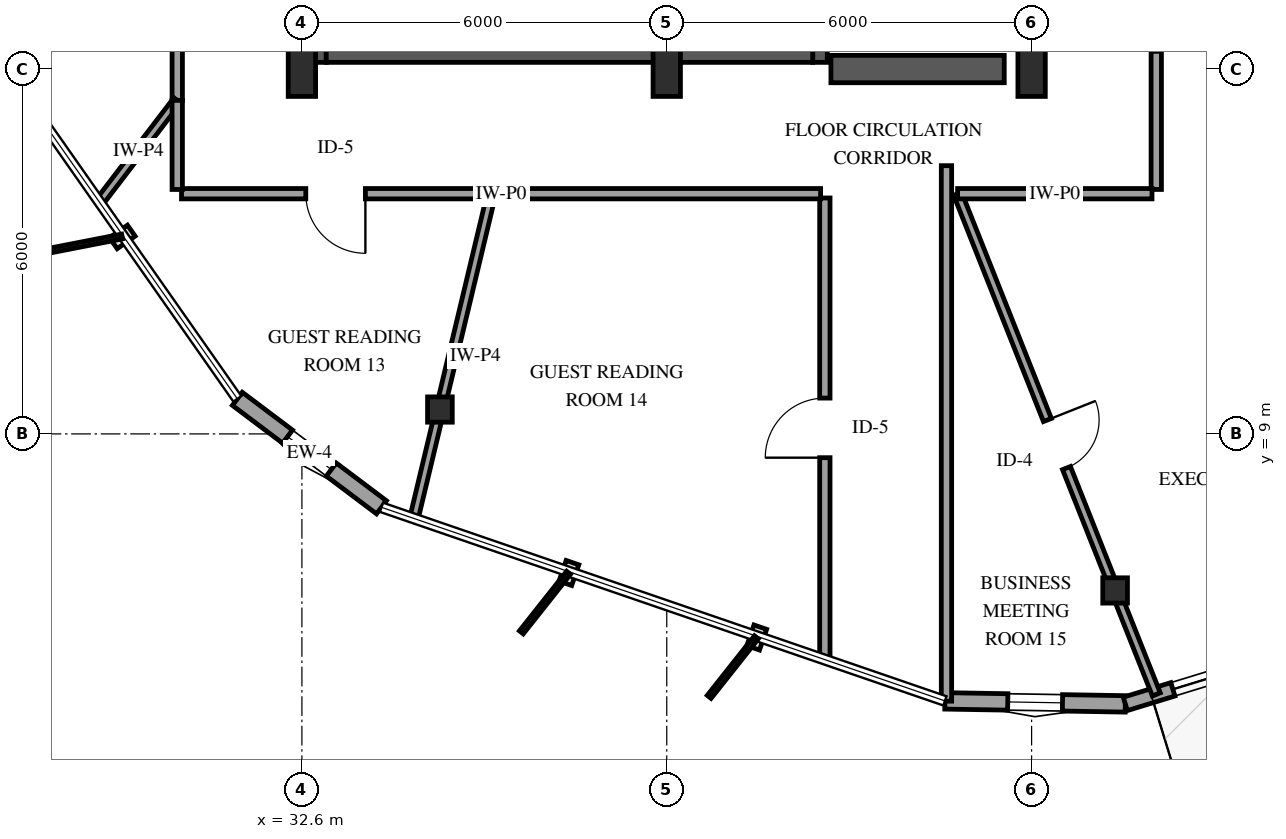
"""IFC4 building model, lengths in metres.
Left out: names, types, materials, properties, quantities, classifications, styles, units other than length and angle.
Written with IfcOpenShell. Run it as: python <this file> out.ifc"""

import sys

from ifc_helpers import new_model, si_unit, direction, frame, frame_2d, origin, origin_2d, place, context, subcontext, project, spatial, rectangle, i_section, extrude, element, fill, save


model = new_model("IFC4")
c1 = context("Model", 3, precision=1e-05, world=origin(), true_north=direction((0.0, 1.0)))
c2 = subcontext(c1, "Body", "Model", "MODEL_VIEW")
j1 = project(units=[si_unit("LENGTHUNIT", "METRE"), si_unit("PLANEANGLEUNIT", "RADIAN")], contexts=[c1])
p1 = place(None, origin())
s1 = spatial("IfcSite", under=j1, at=p1, CompositionType="ELEMENT")
p2 = place(p1, origin())
s2 = spatial("IfcBuilding", under=s1, at=p2, CompositionType="ELEMENT")
p3 = place(p2, frame((0.0, 0.0, 226.6)))
s3 = spatial("IfcBuildingStorey", under=s2, at=p3, CompositionType="ELEMENT", Elevation=226.6)
p4 = place(p3, frame((32.88, 15.11, 0.0), z_axis=(0.0, 0.0, 1.0), x_axis=(0.0, 1.0, 0.0)))
e1 = element("IfcWall", 1, at=p4, inside=s3, PredefinedType="SHEAR", context=c2, shape_type="SweptSolid", body=[
    extrude(rectangle(XDim=3.63, YDim=0.24, at=frame_2d((1.815, 0.0))), origin(), (0.0, 0.0, 1.0), 3.6),
])
p5 = place(p3, frame((41.12, 15.11, 0.0), z_axis=(0.0, 0.0, 1.0), x_axis=(0.0, 1.0, 0.0)))
e2 = element("IfcWall", 2, at=p5, inside=s3, PredefinedType="SHEAR", context=c2, shape_type="SweptSolid", body=[
    extrude(rectangle(XDim=3.63, YDim=0.24, at=frame_2d((1.815, 0.0))), origin(), (0.0, 0.0, 1.0), 3.6),
])
p6 = place(p5, frame((1.255, 0.0, 0.0)))
e3 = element("IfcOpeningElement", 3, at=p6, cuts=e2, PredefinedType="OPENING", context=c2, shape_type="SweptSolid", body=[
    extrude(rectangle(XDim=1.12, YDim=2.15, at=frame_2d((0.56, 1.075))), frame((0.0, 0.13, 0.0), z_axis=(0.0, -1.0, 0.0), x_axis=(1.0, 0.0, 0.0)), (0.0, 0.0, 1.0), 0.26),
])
p7 = place(p3, frame((33.0, 15.23, 0.0), z_axis=(0.0, 0.0, 1.0), x_axis=(1.0, 0.0, 0.0)))
e4 = element("IfcWall", 4, at=p7, inside=s3, PredefinedType="SHEAR", context=c2, shape_type="SweptSolid", body=[
    extrude(rectangle(XDim=8.0, YDim=0.24, at=frame_2d((4.0, 0.0))), origin(), (0.0, 0.0, 1.0), 3.6),
])
p8 = place(p3, frame((41.3, 15.0, 0.0), z_axis=(0.0, 0.0, 1.0), x_axis=(1.0, 0.0, 0.0)))
e5 = element("IfcWall", 5, at=p8, inside=s3, PredefinedType="SHEAR", context=c2, shape_type="SweptSolid", body=[
    extrude(rectangle(XDim=2.85, YDim=0.45, at=frame_2d((1.425, 0.0))), origin(), (0.0, 0.0, 1.0), 3.6),
])
for number, where, z_axis, x_axis in (
    (6, (32.6, 15.0, 0.0), (0.0, 0.0, 1.0), (1.0, 0.0, 0.0)),
    (7, (38.6, 15.0, 0.0), (0.0, 0.0, 1.0), (1.0, 0.0, 0.0)),
    (8, (44.6, 15.0, 0.0), (0.0, 0.0, 1.0), (1.0, 0.0, 0.0)),
):
    element("IfcColumn", number, at=place(p3, frame(where, z_axis=z_axis, x_axis=x_axis)), inside=s3, PredefinedType="PILASTER", context=c2, shape_type="SweptSolid", body=[
        extrude(rectangle(XDim=0.45, YDim=0.9, at=origin_2d()), origin(), (0.0, 0.0, 1.0), 3.6),
    ])
for number, where, z_axis, x_axis in (
    (9, (34.87, 9.401, 0.0), (0.0, 0.0, 1.0), (1.0, 0.0, 0.0)),
    (10, (45.973, 6.426, 0.0), (0.0, 0.0, 1.0), (1.0, 0.0, 0.0)),
):
    element("IfcColumn", number, at=place(p3, frame(where, z_axis=z_axis, x_axis=x_axis)), inside=s3, PredefinedType="COLUMN", context=c2, shape_type="SweptSolid", body=[
        extrude(i_section(OverallWidth=0.406, OverallDepth=0.416, WebThickness=0.03, FlangeThickness=0.048, FilletRadius=0.038, at=origin_2d()), origin(), (0.0, 0.0, 1.0), 3.6),
    ])
p9 = place(p3, frame((31.538, 9.577, 0.0), z_axis=(0.0, 0.0, 1.0), x_axis=(0.799041019951, -0.601276515786, 0.0)))
e11 = element("IfcWall", 11, at=p9, inside=s3, PredefinedType="SOLIDWALL", context=c2, shape_type="SweptSolid", body=[
    extrude(rectangle(XDim=2.967, YDim=0.27, at=frame_2d((1.483, 0.0))), origin(), (0.0, 0.0, 1.0), 2.679),
])
p10 = place(p9, frame((1.033, 0.0, 0.75)))
e12 = element("IfcOpeningElement", 12, at=p10, cuts=e11, PredefinedType="OPENING", context=c2, shape_type="SweptSolid", body=[
    extrude(rectangle(XDim=0.9, YDim=1.5, at=frame_2d((0.45, 0.75))), frame((0.0, 0.145, 0.0), z_axis=(0.0, -1.0, 0.0), x_axis=(1.0, 0.0, 0.0)), (0.0, 0.0, 1.0), 0.29),
])
p11 = place(p3, frame((43.175, 4.61, 0.0), z_axis=(0.0, 0.0, 1.0), x_axis=(0.999860453609, -0.016705487414, 0.0)))
e13 = element("IfcWall", 13, at=p11, inside=s3, PredefinedType="SOLIDWALL", context=c2, shape_type="SweptSolid", body=[
    extrude(rectangle(XDim=2.967, YDim=0.27, at=frame_2d((1.483, 0.0))), origin(), (0.0, 0.0, 1.0), 2.679),
])
p12 = place(p11, frame((1.033, 0.0, 0.75)))
e14 = element("IfcOpeningElement", 14, at=p12, cuts=e13, PredefinedType="OPENING", context=c2, shape_type="SweptSolid", body=[
    extrude(rectangle(XDim=0.9, YDim=1.5, at=frame_2d((0.45, 0.75))), frame((0.0, 0.145, 0.0), z_axis=(0.0, -1.0, 0.0), x_axis=(1.0, 0.0, 0.0)), (0.0, 0.0, 1.0), 0.29),
])
p13 = place(p3, frame((46.141, 4.56, 0.0), z_axis=(0.0, 0.0, 1.0), x_axis=(0.956099551419, 0.293042058033, 0.0)))
e15 = element("IfcWall", 15, at=p13, inside=s3, PredefinedType="SOLIDWALL", context=c2, shape_type="SweptSolid", body=[
    extrude(rectangle(XDim=9.798, YDim=0.23, at=frame_2d((4.899, 0.0))), origin(), (0.0, 0.0, 1.0), 2.679),
])
p14 = place(p13, frame((4.399, 0.0, 0.0)))
e16 = element("IfcOpeningElement", 16, at=p14, cuts=e15, PredefinedType="OPENING", context=c2, shape_type="SweptSolid", body=[
    extrude(rectangle(XDim=1.0, YDim=2.15, at=frame_2d((0.5, 1.075))), frame((0.0, 0.125, 0.0), z_axis=(0.0, -1.0, 0.0), x_axis=(1.0, 0.0, 0.0)), (0.0, 0.0, 1.0), 0.25),
])
p15 = place(p13, frame((0.818, 0.0, 0.72)))
e17 = element("IfcOpeningElement", 17, at=p15, cuts=e15, PredefinedType="OPENING", context=c2, shape_type="SweptSolid", body=[
    extrude(rectangle(XDim=1.05, YDim=1.55, at=frame_2d((0.525, 0.775))), frame((0.0, 0.125, 0.0), z_axis=(0.0, -1.0, 0.0), x_axis=(1.0, 0.0, 0.0)), (0.0, 0.0, 1.0), 0.25),
])
p16 = place(p13, frame((6.039, 0.0, 0.72)))
e18 = element("IfcOpeningElement", 18, at=p16, cuts=e15, PredefinedType="OPENING", context=c2, shape_type="SweptSolid", body=[
    extrude(rectangle(XDim=1.05, YDim=1.55, at=frame_2d((0.525, 0.775))), frame((0.0, 0.125, 0.0), z_axis=(0.0, -1.0, 0.0), x_axis=(1.0, 0.0, 0.0)), (0.0, 0.0, 1.0), 0.25),
])
p17 = place(p3, frame((46.65, 21.265, 0.0), z_axis=(0.0, 0.0, 1.0), x_axis=(0.907114550352, -0.420883823091, 0.0)))
e19 = element("IfcWall", 19, at=p17, inside=s3, PredefinedType="PARTITIONING", context=c2, shape_type="SweptSolid", body=[
    extrude(rectangle(XDim=16.682, YDim=0.13, at=frame_2d((8.341, 0.0))), origin(), (0.0, 0.0, 1.0), 3.3),
])
p18 = place(p3, frame((46.65, 18.573, 0.0), z_axis=(0.0, 0.0, 1.0), x_axis=(0.781476039423, -0.623935252897, 0.0)))
e20 = element("IfcWall", 20, at=p18, inside=s3, PredefinedType="PARTITIONING", context=c2, shape_type="SweptSolid", body=[
    extrude(rectangle(XDim=14.7, YDim=0.11, at=frame_2d((7.35, 0.0))), origin(), (0.0, 0.0, 1.0), 3.3),
])
p19 = place(p3, frame((43.383, 12.95, 0.0), z_axis=(0.0, 0.0, 1.0), x_axis=(0.368885203629, -0.929474962838, 0.0)))
e21 = element("IfcWall", 21, at=p19, inside=s3, PredefinedType="PARTITIONING", context=c2, shape_type="SweptSolid", body=[
    extrude(rectangle(XDim=8.859, YDim=0.14, at=frame_2d((4.429, 0.0))), origin(), (0.0, 0.0, 1.0), 2.595),
])
p20 = place(p19, frame((4.004, 0.0, 0.0)))
e22 = element("IfcOpeningElement", 22, at=p20, cuts=e21, PredefinedType="OPENING", context=c2, shape_type="SweptSolid", body=[
    extrude(rectangle(XDim=0.85, YDim=2.1, at=frame_2d((0.425, 1.05))), frame((0.0, 0.08, 0.0), z_axis=(0.0, -1.0, 0.0), x_axis=(1.0, 0.0, 0.0)), (0.0, 0.0, 1.0), 0.16),
])
p21 = place(p3, frame((41.2, 5.288, 0.0), z_axis=(0.0, 0.0, 1.0), x_axis=(0.0, 1.0, 0.0)))
e23 = element("IfcWall", 23, at=p21, inside=s3, PredefinedType="PARTITIONING", context=c2, shape_type="SweptSolid", body=[
    extrude(rectangle(XDim=7.592, YDim=0.17, at=frame_2d((3.796, 0.0))), origin(), (0.0, 0.0, 1.0), 3.3),
])
p22 = place(p21, frame((3.321, 0.0, 0.0)))
e24 = element("IfcOpeningElement", 24, at=p22, cuts=e23, PredefinedType="OPENING", context=c2, shape_type="SweptSolid", body=[
    extrude(rectangle(XDim=0.98, YDim=2.15, at=frame_2d((0.49, 1.075))), frame((0.0, 0.095, 0.0), z_axis=(0.0, -1.0, 0.0), x_axis=(1.0, 0.0, 0.0)), (0.0, 0.0, 1.0), 0.19),
])
p23 = place(p3, frame((30.55, 14.485, 0.0), z_axis=(0.0, 0.0, 1.0), x_axis=(0.0, 1.0, 0.0)))
e25 = element("IfcWall", 25, at=p23, inside=s3, PredefinedType="PARTITIONING", context=c2, shape_type="SweptSolid", body=[
    extrude(rectangle(XDim=5.621, YDim=0.17, at=frame_2d((2.811, 0.0))), origin(), (0.0, 0.0, 1.0), 3.3),
])
p24 = place(p23, frame((2.336, 0.0, 0.0)))
e26 = element("IfcOpeningElement", 26, at=p24, cuts=e25, PredefinedType="OPENING", context=c2, shape_type="SweptSolid", body=[
    extrude(rectangle(XDim=0.98, YDim=2.15, at=frame_2d((0.49, 1.075))), frame((0.0, 0.095, 0.0), z_axis=(0.0, -1.0, 0.0), x_axis=(1.0, 0.0, 0.0)), (0.0, 0.0, 1.0), 0.19),
])
p25 = place(p3, frame((46.65, 18.573, 0.0), z_axis=(0.0, 0.0, 1.0), x_axis=(0.0, -1.0, 0.0)))
e27 = element("IfcWall", 27, at=p25, inside=s3, PredefinedType="PARTITIONING", context=c2, shape_type="SweptSolid", body=[
    extrude(rectangle(XDim=5.553, YDim=0.17, at=frame_2d((2.776, 0.0))), origin(), (0.0, 0.0, 1.0), 3.3),
])
p26 = place(p25, frame((2.302, 0.0, 0.0)))
e28 = element("IfcOpeningElement", 28, at=p26, cuts=e27, PredefinedType="OPENING", context=c2, shape_type="SweptSolid", body=[
    extrude(rectangle(XDim=0.98, YDim=2.15, at=frame_2d((0.49, 1.075))), frame((0.0, 0.095, 0.0), z_axis=(0.0, -1.0, 0.0), x_axis=(1.0, 0.0, 0.0)), (0.0, 0.0, 1.0), 0.19),
])
p27 = place(p3, frame((35.719, 12.95, 0.0), z_axis=(0.0, 0.0, 1.0), x_axis=(-0.232604301891, -0.972571456882, 0.0)))
e29 = element("IfcWall", 29, at=p27, inside=s3, PredefinedType="PARTITIONING", context=c2, shape_type="SweptSolid", body=[
    extrude(rectangle(XDim=5.49, YDim=0.14, at=frame_2d((2.745, 0.0))), origin(), (0.0, 0.0, 1.0), 2.595),
])
p28 = place(p3, frame((41.13, 12.95, 0.0), z_axis=(0.0, 0.0, 1.0), x_axis=(-1.0, 0.0, 0.0)))
e30 = element("IfcWall", 30, at=p28, inside=s3, PredefinedType="PARTITIONING", context=c2, shape_type="SweptSolid", body=[
    extrude(rectangle(XDim=5.411, YDim=0.17, at=frame_2d((2.706, 0.0))), origin(), (0.0, 0.0, 1.0), 3.3),
])
p29 = place(p3, frame((35.719, 12.95, 0.0), z_axis=(0.0, 0.0, 1.0), x_axis=(-1.0, 0.0, 0.0)))
e31 = element("IfcWall", 31, at=p29, inside=s3, PredefinedType="PARTITIONING", context=c2, shape_type="SweptSolid", body=[
    extrude(rectangle(XDim=5.099, YDim=0.17, at=frame_2d((2.549, 0.0))), origin(), (0.0, 0.0, 1.0), 3.3),
])
p30 = place(p29, frame((2.075, 0.0, 0.0)))
e32 = element("IfcOpeningElement", 32, at=p30, cuts=e31, PredefinedType="OPENING", context=c2, shape_type="SweptSolid", body=[
    extrude(rectangle(XDim=0.98, YDim=2.15, at=frame_2d((0.49, 1.075))), frame((0.0, 0.095, 0.0), z_axis=(0.0, -1.0, 0.0), x_axis=(1.0, 0.0, 0.0)), (0.0, 0.0, 1.0), 0.19),
])
p31 = place(p3, frame((46.58, 12.95, 0.0), z_axis=(0.0, 0.0, 1.0), x_axis=(-1.0, 0.0, 0.0)))
e33 = element("IfcWall", 33, at=p31, inside=s3, PredefinedType="PARTITIONING", context=c2, shape_type="SweptSolid", body=[
    extrude(rectangle(XDim=3.197, YDim=0.17, at=frame_2d((1.599, 0.0))), origin(), (0.0, 0.0, 1.0), 3.3),
])
p32 = place(p3, frame((30.55, 14.485, 0.0), z_axis=(0.0, 0.0, 1.0), x_axis=(-0.607630764598, -0.794219650924, 0.0)))
e34 = element("IfcWall", 34, at=p32, inside=s3, PredefinedType="PARTITIONING", context=c2, shape_type="SweptSolid", body=[
    extrude(rectangle(XDim=2.107, YDim=0.14, at=frame_2d((1.053, 0.0))), origin(), (0.0, 0.0, 1.0), 3.3),
])
p33 = place(p3, frame((30.55, 13.02, 0.0), z_axis=(0.0, 0.0, 1.0), x_axis=(0.0, 1.0, 0.0)))
e35 = element("IfcWall", 35, at=p33, inside=s3, PredefinedType="PARTITIONING", context=c2, shape_type="SweptSolid", body=[
    extrude(rectangle(XDim=1.465, YDim=0.17, at=frame_2d((0.732, 0.0))), origin(), (0.0, 0.0, 1.0), 3.3),
])
p34 = place(p3, frame((43.2, 13.411, 0.0), z_axis=(0.0, 0.0, 1.0), x_axis=(0.0, -1.0, 0.0)))
e36 = element("IfcWall", 36, at=p34, inside=s3, PredefinedType="PARTITIONING", context=c2, shape_type="SweptSolid", body=[
    extrude(rectangle(XDim=8.806, YDim=0.17, at=frame_2d((4.403, 0.0))), origin(), (0.0, 0.0, 1.0), 2.678),
])
p35 = place(p10, origin())
e37 = element("IfcWindow", 37, at=p35, inside=s3, PartitioningType="SINGLE_PANEL", PredefinedType="WINDOW", context=c2, shape_type="SweptSolid", body=[
    extrude(rectangle(XDim=0.9, YDim=1.5, at=frame_2d((0.45, 0.75))), frame((0.0, 0.03, 0.0), z_axis=(0.0, -1.0, 0.0), x_axis=(1.0, 0.0, 0.0)), (0.0, 0.0, 1.0), 0.06),
])
fill(e12, e37)
p36 = place(p12, origin())
e38 = element("IfcWindow", 38, at=p36, inside=s3, PartitioningType="SINGLE_PANEL", PredefinedType="WINDOW", context=c2, shape_type="SweptSolid", body=[
    extrude(rectangle(XDim=0.9, YDim=1.5, at=frame_2d((0.45, 0.75))), frame((0.0, 0.03, 0.0), z_axis=(0.0, -1.0, 0.0), x_axis=(1.0, 0.0, 0.0)), (0.0, 0.0, 1.0), 0.06),
])
fill(e14, e38)
p37 = place(p15, origin())
e39 = element("IfcWindow", 39, at=p37, inside=s3, PartitioningType="SINGLE_PANEL", PredefinedType="WINDOW", context=c2, shape_type="SweptSolid", body=[
    extrude(rectangle(XDim=1.05, YDim=1.55, at=frame_2d((0.525, 0.775))), frame((0.0, 0.03, 0.0), z_axis=(0.0, -1.0, 0.0), x_axis=(1.0, 0.0, 0.0)), (0.0, 0.0, 1.0), 0.06),
])
fill(e17, e39)
p38 = place(p20, origin())
e40 = element("IfcDoor", 40, at=p38, inside=s3, OperationType="SINGLE_SWING_LEFT", PredefinedType="DOOR", context=c2, shape_type="SweptSolid", body=[
    extrude(rectangle(XDim=0.85, YDim=2.1, at=frame_2d((0.425, 1.05))), frame((0.0, 0.025, 0.0), z_axis=(0.0, -1.0, 0.0), x_axis=(1.0, 0.0, 0.0)), (0.0, 0.0, 1.0), 0.05),
])
fill(e22, e40)
p39 = place(p22, origin())
e41 = element("IfcDoor", 41, at=p39, inside=s3, OperationType="SINGLE_SWING_LEFT", PredefinedType="DOOR", context=c2, shape_type="SweptSolid", body=[
    extrude(rectangle(XDim=0.98, YDim=2.15, at=frame_2d((0.49, 1.075))), frame((0.0, 0.025, 0.0), z_axis=(0.0, -1.0, 0.0), x_axis=(1.0, 0.0, 0.0)), (0.0, 0.0, 1.0), 0.05),
])
fill(e24, e41)
p40 = place(p30, origin())
e42 = element("IfcDoor", 42, at=p40, inside=s3, OperationType="SINGLE_SWING_LEFT", PredefinedType="DOOR", context=c2, shape_type="SweptSolid", body=[
    extrude(rectangle(XDim=0.98, YDim=2.15, at=frame_2d((0.49, 1.075))), frame((0.0, 0.025, 0.0), z_axis=(0.0, -1.0, 0.0), x_axis=(1.0, 0.0, 0.0)), (0.0, 0.0, 1.0), 0.05),
])
fill(e32, e42)
save(model, sys.argv[1])
